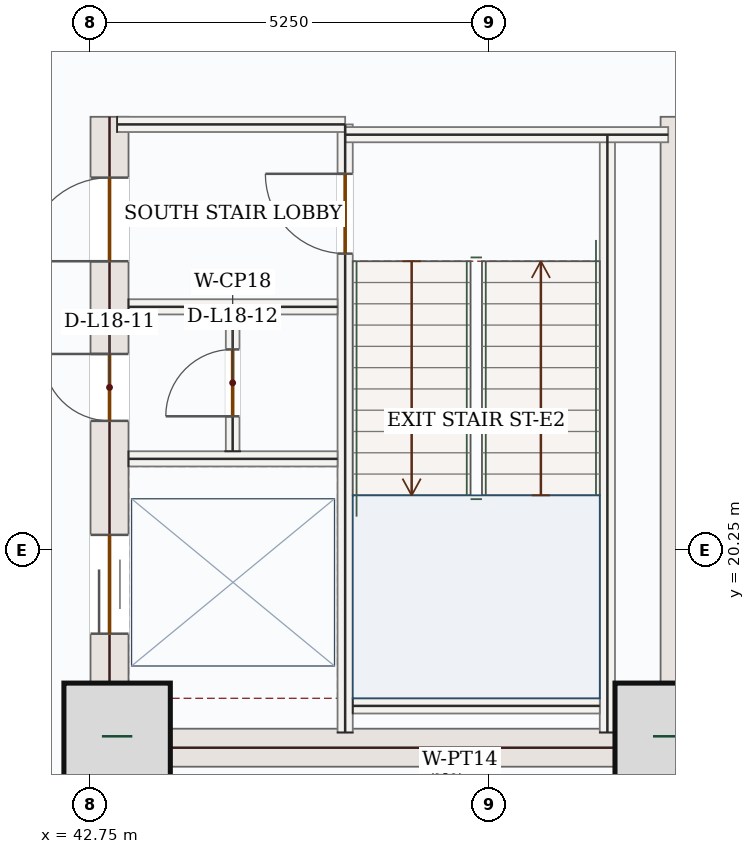
"""IFC4 building model, lengths in metres.
Left out: names, types, materials, properties, quantities, classifications, styles, units other than length and angle.
Written with IfcOpenShell. Run it as: python <this file> out.ifc"""

import sys

from ifc_helpers import new_model, si_unit, direction, frame, frame_2d, origin, origin_2d, place, context, subcontext, project, spatial, rectangle, extrude, source, transform, mapped, element, fill, save


model = new_model("IFC4")
c1 = context("Model", 3, precision=1e-05, world=origin(), true_north=direction((0.0, 1.0)))
c2 = subcontext(c1, "Body", "Model", "MODEL_VIEW")
j1 = project(units=[si_unit("LENGTHUNIT", "METRE"), si_unit("PLANEANGLEUNIT", "RADIAN")], contexts=[c1])
p1 = place(None, origin())
s1 = spatial("IfcSite", under=j1, at=p1, CompositionType="ELEMENT")
p2 = place(p1, origin())
s2 = spatial("IfcBuilding", under=s1, at=p2, CompositionType="ELEMENT")
p3 = place(p2, frame((0.0, 0.0, 83.7)))
s3 = spatial("IfcBuildingStorey", under=s2, at=p3, CompositionType="ELEMENT", Elevation=83.7)
p4 = place(p3, frame((43.0, 17.4, 0.0), z_axis=(0.0, 0.0, 1.0), x_axis=(0.0, 1.0, 0.0)))
e1 = element("IfcWall", 1, at=p4, inside=s3, PredefinedType="SHEAR", context=c2, shape_type="SweptSolid", body=[
    extrude(rectangle(XDim=8.55, YDim=0.5, at=frame_2d((4.275, 0.0))), origin(), (0.0, 0.0, 1.0), 3.95),
])
p5 = place(p4, frame((6.65, 0.0, 0.0)))
e2 = element("IfcOpeningElement", 2, at=p5, cuts=e1, PredefinedType="OPENING", context=c2, shape_type="SweptSolid", body=[
    extrude(rectangle(XDim=1.1, YDim=2.2, at=frame_2d((0.55, 1.1))), frame((0.0, 0.26, 0.0), z_axis=(0.0, -1.0, 0.0), x_axis=(1.0, 0.0, 0.0)), (0.0, 0.0, 1.0), 0.52),
])
p6 = place(p4, frame((1.75, 0.0, 0.0)))
e3 = element("IfcOpeningElement", 3, at=p6, cuts=e1, PredefinedType="OPENING", context=c2, shape_type="SweptSolid", body=[
    extrude(rectangle(XDim=1.3, YDim=2.2, at=frame_2d((0.65, 1.1))), frame((0.0, 0.26, 0.0), z_axis=(0.0, -1.0, 0.0), x_axis=(1.0, 0.0, 0.0)), (0.0, 0.0, 1.0), 0.52),
])
p7 = place(p4, frame((4.55, 0.0, 0.0)))
e4 = element("IfcOpeningElement", 4, at=p7, cuts=e1, PredefinedType="OPENING", context=c2, shape_type="SweptSolid", body=[
    extrude(rectangle(XDim=0.88, YDim=2.1, at=frame_2d((0.44, 1.05))), frame((0.0, 0.26, 0.0), z_axis=(0.0, -1.0, 0.0), x_axis=(1.0, 0.0, 0.0)), (0.0, 0.0, 1.0), 0.52),
])
m1 = source(origin(), c2, "Body", "SweptSolid", [
    extrude(rectangle(XDim=8.55, YDim=0.5, at=frame_2d((4.275, 0.0))), origin(), (0.0, 0.0, 1.0), 3.95),
])
p8 = place(p3, frame((50.5, 17.4, 0.0), z_axis=(0.0, 0.0, 1.0), x_axis=(0.0, 1.0, 0.0)))
e5 = element("IfcWall", 5, at=p8, inside=s3, PredefinedType="SHEAR", context=c2, shape_type="MappedRepresentation", body=[
    mapped(m1, transform((0.0, 0.0, 0.0), x_axis=(1.0, 0.0, 0.0), y_axis=(0.0, 1.0, 0.0), z_axis=(0.0, 0.0, 1.0), scale=1.0)),
])
m2 = source(origin(), c2, "Body", "SweptSolid", [
    extrude(rectangle(XDim=7.0, YDim=0.5, at=frame_2d((3.5, 0.0))), origin(), (0.0, 0.0, 1.0), 3.95),
])
p9 = place(p3, frame((43.25, 17.65, 0.0), z_axis=(0.0, 0.0, 1.0), x_axis=(1.0, 0.0, 0.0)))
e6 = element("IfcWall", 6, at=p9, inside=s3, PredefinedType="SHEAR", context=c2, shape_type="MappedRepresentation", body=[
    mapped(m2, transform((0.0, 0.0, 0.0), x_axis=(1.0, 0.0, 0.0), y_axis=(0.0, 1.0, 0.0), z_axis=(0.0, 0.0, 1.0), scale=1.0)),
])
m3 = source(origin(), c2, "Body", "SweptSolid", [
    extrude(rectangle(XDim=1.4, YDim=1.4, at=origin_2d()), origin(), (0.0, 0.0, 1.0), 4.2),
])
for number, where, z_axis, x_axis in (
    (7, (43.1, 17.8, 0.0), (0.0, 0.0, 1.0), (1.0, 0.0, 0.0)),
    (8, (50.35, 17.8, 0.0), (0.0, 0.0, 1.0), (1.0, 0.0, 0.0)),
):
    element("IfcColumn", number, at=place(p3, frame(where, z_axis=z_axis, x_axis=x_axis)), inside=s3, PredefinedType="COLUMN", context=c2, shape_type="MappedRepresentation", body=[
        mapped(m3, transform((0.0, 0.0, 0.0), x_axis=(1.0, 0.0, 0.0), y_axis=(0.0, 1.0, 0.0), z_axis=(0.0, 0.0, 1.0), scale=1.0)),
    ])
p10 = place(p3, frame((53.06, 18.458, 0.0), z_axis=(0.0, 0.0, 1.0), x_axis=(-0.707106781187, -0.707106781187, 0.0)))
e9 = element("IfcWall", 9, at=p10, inside=s3, PredefinedType="SOLIDWALL", context=c2, shape_type="SweptSolid", body=[
    extrude(rectangle(XDim=5.258, YDim=0.32, at=frame_2d((2.629, 0.0))), origin(), (0.0, 0.0, 1.0), 3.95),
])
p11 = place(p10, frame((1.429, 0.0, 0.85)))
e10 = element("IfcOpeningElement", 10, at=p11, cuts=e9, PredefinedType="OPENING", context=c2, shape_type="SweptSolid", body=[
    extrude(rectangle(XDim=2.4, YDim=1.8, at=frame_2d((1.2, 0.9))), frame((0.0, 0.17, 0.0), z_axis=(0.0, -1.0, 0.0), x_axis=(1.0, 0.0, 0.0)), (0.0, 0.0, 1.0), 0.34),
])
m4 = source(origin(), c2, "Body", "SweptSolid", [
    extrude(rectangle(XDim=7.87, YDim=0.2, at=frame_2d((3.935, 0.0))), origin(), (0.0, 0.0, 1.0), 3.95),
])
p12 = place(p3, frame((49.55, 17.85, 0.0), z_axis=(0.0, 0.0, 1.0), x_axis=(0.0, 1.0, 0.0)))
e11 = element("IfcWall", 11, at=p12, inside=s3, PredefinedType="SOLIDWALL", context=c2, shape_type="MappedRepresentation", body=[
    mapped(m4, transform((0.0, 0.0, 0.0), x_axis=(1.0, 0.0, 0.0), y_axis=(0.0, 1.0, 0.0), z_axis=(0.0, 0.0, 1.0), scale=1.0)),
])
p13 = place(p3, frame((46.1, 17.85, 0.0), z_axis=(0.0, 0.0, 1.0), x_axis=(0.0, 1.0, 0.0)))
e12 = element("IfcWall", 12, at=p13, inside=s3, PredefinedType="SOLIDWALL", context=c2, shape_type="SweptSolid", body=[
    extrude(rectangle(XDim=8.0, YDim=0.2, at=frame_2d((4.0, 0.0))), origin(), (0.0, 0.0, 1.0), 3.95),
])
p14 = place(p13, frame((6.3, 0.0, 0.0)))
e13 = element("IfcOpeningElement", 13, at=p14, cuts=e12, PredefinedType="OPENING", context=c2, shape_type="SweptSolid", body=[
    extrude(rectangle(XDim=1.05, YDim=2.15, at=frame_2d((0.525, 1.075))), frame((0.0, 0.11, 0.0), z_axis=(0.0, -1.0, 0.0), x_axis=(1.0, 0.0, 0.0)), (0.0, 0.0, 1.0), 0.22),
])
m5 = source(origin(), c2, "Body", "SweptSolid", [
    extrude(rectangle(XDim=3.0, YDim=0.2, at=frame_2d((1.5, 0.0))), origin(), (0.0, 0.0, 1.0), 3.95),
])
p15 = place(p3, frame((43.1, 25.85, 0.0), z_axis=(0.0, 0.0, 1.0), x_axis=(1.0, 0.0, 0.0)))
e14 = element("IfcWall", 14, at=p15, inside=s3, PredefinedType="SOLIDWALL", context=c2, shape_type="MappedRepresentation", body=[
    mapped(m5, transform((0.0, 0.0, 0.0), x_axis=(1.0, 0.0, 0.0), y_axis=(0.0, 1.0, 0.0), z_axis=(0.0, 0.0, 1.0), scale=1.0)),
])
m6 = source(origin(), c2, "Body", "SweptSolid", [
    extrude(rectangle(XDim=4.25, YDim=0.2, at=frame_2d((2.125, 0.0))), origin(), (0.0, 0.0, 1.0), 3.95),
])
p16 = place(p3, frame((46.1, 25.715, 0.0), z_axis=(0.0, 0.0, 1.0), x_axis=(1.0, 0.0, 0.0)))
e15 = element("IfcWall", 15, at=p16, inside=s3, PredefinedType="SOLIDWALL", context=c2, shape_type="MappedRepresentation", body=[
    mapped(m6, transform((0.0, 0.0, 0.0), x_axis=(1.0, 0.0, 0.0), y_axis=(0.0, 1.0, 0.0), z_axis=(0.0, 0.0, 1.0), scale=1.0)),
])
m7 = source(origin(), c2, "Body", "SweptSolid", [
    extrude(rectangle(XDim=3.25, YDim=0.2, at=frame_2d((1.625, 0.0))), origin(), (0.0, 0.0, 1.0), 3.95),
])
p17 = place(p3, frame((46.2, 18.2, 0.0), z_axis=(0.0, 0.0, 1.0), x_axis=(1.0, 0.0, 0.0)))
e16 = element("IfcWall", 16, at=p17, inside=s3, PredefinedType="SOLIDWALL", context=c2, shape_type="MappedRepresentation", body=[
    mapped(m7, transform((0.0, 0.0, 0.0), x_axis=(1.0, 0.0, 0.0), y_axis=(0.0, 1.0, 0.0), z_axis=(0.0, 0.0, 1.0), scale=1.0)),
])
m8 = source(origin(), c2, "Body", "SweptSolid", [
    extrude(rectangle(XDim=2.75, YDim=0.2, at=frame_2d((1.375, 0.0))), origin(), (0.0, 0.0, 1.0), 3.95),
])
for number, where, z_axis, x_axis in (
    (17, (43.25, 23.45, 0.0), (0.0, 0.0, 1.0), (1.0, 0.0, 0.0)),
    (18, (43.25, 21.45, 0.0), (0.0, 0.0, 1.0), (1.0, 0.0, 0.0)),
):
    element("IfcWall", number, at=place(p3, frame(where, z_axis=z_axis, x_axis=x_axis)), inside=s3, PredefinedType="SOLIDWALL", context=c2, shape_type="MappedRepresentation", body=[
        mapped(m8, transform((0.0, 0.0, 0.0), x_axis=(1.0, 0.0, 0.0), y_axis=(0.0, 1.0, 0.0), z_axis=(0.0, 0.0, 1.0), scale=1.0)),
    ])
p18 = place(p3, frame((44.62, 21.55, 0.0), z_axis=(0.0, 0.0, 1.0), x_axis=(0.0, 1.0, 0.0)))
e19 = element("IfcWall", 19, at=p18, inside=s3, PredefinedType="PARTITIONING", context=c2, shape_type="SweptSolid", body=[
    extrude(rectangle(XDim=1.8, YDim=0.18, at=frame_2d((0.9, 0.0))), origin(), (0.0, 0.0, 1.0), 3.95),
])
p19 = place(p18, frame((0.46, 0.0, 0.0)))
e20 = element("IfcOpeningElement", 20, at=p19, cuts=e19, PredefinedType="OPENING", context=c2, shape_type="SweptSolid", body=[
    extrude(rectangle(XDim=0.88, YDim=2.1, at=frame_2d((0.44, 1.05))), frame((0.0, 0.1, 0.0), z_axis=(0.0, -1.0, 0.0), x_axis=(1.0, 0.0, 0.0)), (0.0, 0.0, 1.0), 0.2),
])
m9 = source(origin(), c2, "Body", "SweptSolid", [
    extrude(rectangle(XDim=0.761, YDim=0.14, at=frame_2d((0.38, 0.0))), origin(), (0.0, 0.0, 1.0), 3.95),
])
p20 = place(p3, frame((47.318, 17.395, 0.0), z_axis=(0.0, 0.0, 1.0), x_axis=(0.764128340752, -0.645064243978, 0.0)))
e21 = element("IfcWall", 21, at=p20, inside=s3, PredefinedType="PARTITIONING", context=c2, shape_type="MappedRepresentation", body=[
    mapped(m9, transform((0.0, 0.0, 0.0), x_axis=(1.0, 0.0, 0.0), y_axis=(0.0, 1.0, 0.0), z_axis=(0.0, 0.0, 1.0), scale=1.0)),
])
m10 = source(origin(), c2, "Body", "SweptSolid", [
    extrude(rectangle(XDim=2.4, YDim=1.8, at=frame_2d((1.2, 0.9))), frame((0.0, 0.03, 0.0), z_axis=(0.0, -1.0, 0.0), x_axis=(1.0, 0.0, 0.0)), (0.0, 0.0, 1.0), 0.06),
])
p21 = place(p11, origin())
e22 = element("IfcWindow", 22, at=p21, inside=s3, PartitioningType="DOUBLE_PANEL_VERTICAL", PredefinedType="WINDOW", context=c2, shape_type="MappedRepresentation", body=[
    mapped(m10, transform((0.0, 0.0, 0.0), x_axis=(1.0, 0.0, 0.0), y_axis=(0.0, 1.0, 0.0), z_axis=(0.0, 0.0, 1.0), scale=1.0)),
])
fill(e10, e22)
m11 = source(origin(), c2, "Body", "SweptSolid", [
    extrude(rectangle(XDim=1.05, YDim=2.15, at=frame_2d((0.525, 1.075))), frame((0.0, 0.025, 0.0), z_axis=(0.0, -1.0, 0.0), x_axis=(1.0, 0.0, 0.0)), (0.0, 0.0, 1.0), 0.05),
])
p22 = place(p14, origin())
e23 = element("IfcDoor", 23, at=p22, inside=s3, OperationType="SINGLE_SWING_RIGHT", PredefinedType="DOOR", context=c2, shape_type="MappedRepresentation", body=[
    mapped(m11, transform((0.0, 0.0, 0.0), x_axis=(1.0, 0.0, 0.0), y_axis=(0.0, 1.0, 0.0), z_axis=(0.0, 0.0, 1.0), scale=1.0)),
])
fill(e13, e23)
m12 = source(origin(), c2, "Body", "SweptSolid", [
    extrude(rectangle(XDim=1.1, YDim=2.2, at=frame_2d((0.55, 1.1))), frame((0.0, 0.025, 0.0), z_axis=(0.0, -1.0, 0.0), x_axis=(1.0, 0.0, 0.0)), (0.0, 0.0, 1.0), 0.05),
])
p23 = place(p5, origin())
e24 = element("IfcDoor", 24, at=p23, inside=s3, OperationType="SINGLE_SWING_LEFT", PredefinedType="DOOR", context=c2, shape_type="MappedRepresentation", body=[
    mapped(m12, transform((0.0, 0.0, 0.0), x_axis=(1.0, 0.0, 0.0), y_axis=(0.0, 1.0, 0.0), z_axis=(0.0, 0.0, 1.0), scale=1.0)),
])
fill(e2, e24)
m13 = source(origin(), c2, "Body", "SweptSolid", [
    extrude(rectangle(XDim=1.3, YDim=2.2, at=frame_2d((0.65, 1.1))), frame((0.0, 0.025, 0.0), z_axis=(0.0, -1.0, 0.0), x_axis=(1.0, 0.0, 0.0)), (0.0, 0.0, 1.0), 0.05),
])
p24 = place(p6, origin())
e25 = element("IfcDoor", 25, at=p24, inside=s3, OperationType="DOUBLE_DOOR_SLIDING", PredefinedType="DOOR", context=c2, shape_type="MappedRepresentation", body=[
    mapped(m13, transform((0.0, 0.0, 0.0), x_axis=(1.0, 0.0, 0.0), y_axis=(0.0, 1.0, 0.0), z_axis=(0.0, 0.0, 1.0), scale=1.0)),
])
fill(e3, e25)
m14 = source(origin(), c2, "Body", "SweptSolid", [
    extrude(rectangle(XDim=0.88, YDim=2.1, at=frame_2d((0.44, 1.05))), frame((0.0, 0.025, 0.0), z_axis=(0.0, -1.0, 0.0), x_axis=(1.0, 0.0, 0.0)), (0.0, 0.0, 1.0), 0.05),
])
p25 = place(p7, origin())
e26 = element("IfcDoor", 26, at=p25, inside=s3, OperationType="SINGLE_SWING_RIGHT", PredefinedType="DOOR", context=c2, shape_type="MappedRepresentation", body=[
    mapped(m14, transform((0.0, 0.0, 0.0), x_axis=(1.0, 0.0, 0.0), y_axis=(0.0, 1.0, 0.0), z_axis=(0.0, 0.0, 1.0), scale=1.0)),
])
fill(e4, e26)
p26 = place(p19, origin())
e27 = element("IfcDoor", 27, at=p26, inside=s3, OperationType="SINGLE_SWING_LEFT", PredefinedType="DOOR", context=c2, shape_type="MappedRepresentation", body=[
    mapped(m14, transform((0.0, 0.0, 0.0), x_axis=(1.0, 0.0, 0.0), y_axis=(0.0, 1.0, 0.0), z_axis=(0.0, 0.0, 1.0), scale=1.0)),
])
fill(e20, e27)
save(model, sys.argv[1])
